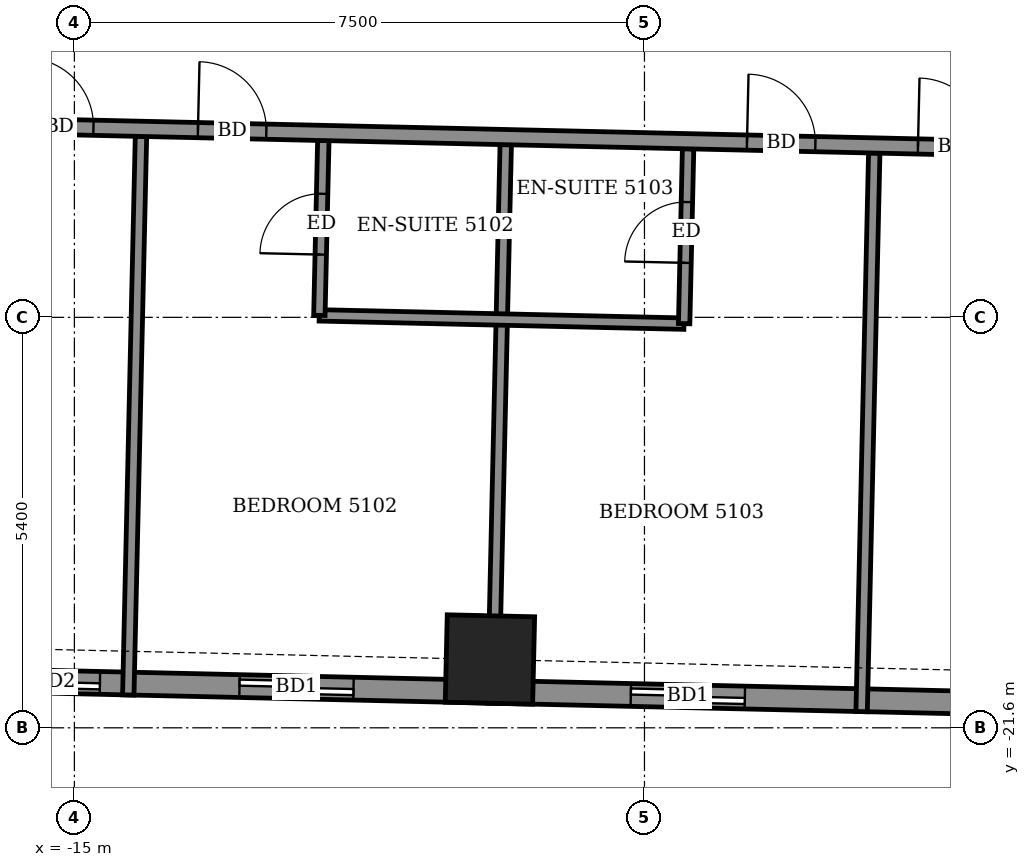
"""IFC4 building model, lengths in metres.
Left out: names, types, materials, properties, quantities, classifications, styles, units other than length and angle.
Written with IfcOpenShell. Run it as: python <this file> out.ifc"""

import sys

from ifc_helpers import new_model, si_unit, direction, frame, frame_2d, origin, origin_2d, place, context, subcontext, project, spatial, rectangle, extrude, element, fill, save


model = new_model("IFC4")
c1 = context("Model", 3, precision=1e-05, world=origin(), true_north=direction((0.0, 1.0)))
c2 = subcontext(c1, "Body", "Model", "MODEL_VIEW")
j1 = project(units=[si_unit("LENGTHUNIT", "METRE"), si_unit("PLANEANGLEUNIT", "RADIAN")], contexts=[c1])
p1 = place(None, origin())
s1 = spatial("IfcSite", under=j1, at=p1, CompositionType="ELEMENT")
p2 = place(p1, origin())
s2 = spatial("IfcBuilding", under=s1, at=p2, CompositionType="ELEMENT")
p3 = place(p2, frame((0.0, 0.0, 201.5)))
s3 = spatial("IfcBuildingStorey", under=s2, at=p3, CompositionType="ELEMENT", Elevation=201.5)
p4 = place(p3, frame((-9.533, -20.701, -0.55), z_axis=(0.0, 0.0, 1.0), x_axis=(0.999742129581, -0.022708464065, 0.0)))
e1 = element("IfcColumn", 1, at=p4, inside=s3, PredefinedType="COLUMN", context=c2, shape_type="SweptSolid", body=[
    extrude(rectangle(XDim=1.15, YDim=1.15, at=origin_2d()), origin(), (0.0, 0.0, 1.0), 3.6),
])
p5 = place(p3, frame((-23.437, -20.81, 0.0), z_axis=(0.0, 0.0, 1.0), x_axis=(0.999742269115, -0.022702320244, 0.0)))
e2 = element("IfcWall", 2, at=p5, inside=s3, PredefinedType="SOLIDWALL", context=c2, shape_type="SweptSolid", body=[
    extrude(rectangle(XDim=41.844, YDim=0.3, at=frame_2d((20.922, 0.0))), origin(), (0.0, 0.0, 1.0), 2.55),
])
p6 = place(p5, frame((1.899, 0.0, 0.0)))
e3 = element("IfcOpeningElement", 3, at=p6, cuts=e2, PredefinedType="OPENING", context=c2, shape_type="SweptSolid", body=[
    extrude(rectangle(XDim=1.5, YDim=2.4, at=frame_2d((0.75, 1.2))), frame((0.0, 0.16, 0.0), z_axis=(0.0, -1.0, 0.0), x_axis=(1.0, 0.0, 0.0)), (0.0, 0.0, 1.0), 0.32),
])
p7 = place(p5, frame((7.575, 0.0, 0.0)))
e4 = element("IfcOpeningElement", 4, at=p7, cuts=e2, PredefinedType="OPENING", context=c2, shape_type="SweptSolid", body=[
    extrude(rectangle(XDim=1.2, YDim=2.4, at=frame_2d((0.6, 1.2))), frame((0.0, 0.16, 0.0), z_axis=(0.0, -1.0, 0.0), x_axis=(1.0, 0.0, 0.0)), (0.0, 0.0, 1.0), 0.32),
])
p8 = place(p5, frame((10.612, 0.0, 0.0)))
e5 = element("IfcOpeningElement", 5, at=p8, cuts=e2, PredefinedType="OPENING", context=c2, shape_type="SweptSolid", body=[
    extrude(rectangle(XDim=1.5, YDim=2.4, at=frame_2d((0.75, 1.2))), frame((0.0, 0.16, 0.0), z_axis=(0.0, -1.0, 0.0), x_axis=(1.0, 0.0, 0.0)), (0.0, 0.0, 1.0), 0.32),
])
p9 = place(p5, frame((15.762, 0.0, 0.0)))
e6 = element("IfcOpeningElement", 6, at=p9, cuts=e2, PredefinedType="OPENING", context=c2, shape_type="SweptSolid", body=[
    extrude(rectangle(XDim=1.5, YDim=2.4, at=frame_2d((0.75, 1.2))), frame((0.0, 0.16, 0.0), z_axis=(0.0, -1.0, 0.0), x_axis=(1.0, 0.0, 0.0)), (0.0, 0.0, 1.0), 0.32),
])
p10 = place(p5, frame((21.648, 0.0, 0.0)))
e7 = element("IfcOpeningElement", 7, at=p10, cuts=e2, PredefinedType="OPENING", context=c2, shape_type="SweptSolid", body=[
    extrude(rectangle(XDim=1.2, YDim=2.4, at=frame_2d((0.6, 1.2))), frame((0.0, 0.16, 0.0), z_axis=(0.0, -1.0, 0.0), x_axis=(1.0, 0.0, 0.0)), (0.0, 0.0, 1.0), 0.32),
])
p11 = place(p5, frame((24.685, 0.0, 0.0)))
e8 = element("IfcOpeningElement", 8, at=p11, cuts=e2, PredefinedType="OPENING", context=c2, shape_type="SweptSolid", body=[
    extrude(rectangle(XDim=1.5, YDim=2.4, at=frame_2d((0.75, 1.2))), frame((0.0, 0.16, 0.0), z_axis=(0.0, -1.0, 0.0), x_axis=(1.0, 0.0, 0.0)), (0.0, 0.0, 1.0), 0.32),
])
p12 = place(p5, frame((29.685, 0.0, 0.0)))
e9 = element("IfcOpeningElement", 9, at=p12, cuts=e2, PredefinedType="OPENING", context=c2, shape_type="SweptSolid", body=[
    extrude(rectangle(XDim=1.5, YDim=2.4, at=frame_2d((0.75, 1.2))), frame((0.0, 0.16, 0.0), z_axis=(0.0, -1.0, 0.0), x_axis=(1.0, 0.0, 0.0)), (0.0, 0.0, 1.0), 0.32),
])
p13 = place(p5, frame((33.022, 0.0, 0.0)))
e10 = element("IfcOpeningElement", 10, at=p13, cuts=e2, PredefinedType="OPENING", context=c2, shape_type="SweptSolid", body=[
    extrude(rectangle(XDim=1.2, YDim=2.4, at=frame_2d((0.6, 1.2))), frame((0.0, 0.16, 0.0), z_axis=(0.0, -1.0, 0.0), x_axis=(1.0, 0.0, 0.0)), (0.0, 0.0, 1.0), 0.32),
])
p14 = place(p5, frame((37.974, 0.0, 0.9)))
e11 = element("IfcOpeningElement", 11, at=p14, cuts=e2, PredefinedType="OPENING", context=c2, shape_type="SweptSolid", body=[
    extrude(rectangle(XDim=2.4, YDim=1.5, at=frame_2d((1.2, 0.75))), frame((0.0, 0.16, 0.0), z_axis=(0.0, -1.0, 0.0), x_axis=(1.0, 0.0, 0.0)), (0.0, 0.0, 1.0), 0.32),
])
p15 = place(p3, frame((-14.291, -21.168, 0.0), z_axis=(0.0, 0.0, 1.0), x_axis=(0.022720650804, 0.999741852694, 0.0)))
e12 = element("IfcWall", 12, at=p15, inside=s3, PredefinedType="PARTITIONING", context=c2, shape_type="SweptSolid", body=[
    extrude(rectangle(XDim=7.35, YDim=0.15, at=frame_2d((3.675, 0.0))), origin(), (0.0, 0.0, 1.0), 2.55),
])
p16 = place(p3, frame((-9.492, -21.277, 0.0), z_axis=(0.0, 0.0, 1.0), x_axis=(0.022719896304, 0.99974186984, 0.0)))
e13 = element("IfcWall", 13, at=p16, inside=s3, PredefinedType="PARTITIONING", context=c2, shape_type="SweptSolid", body=[
    extrude(rectangle(XDim=7.35, YDim=0.15, at=frame_2d((3.675, 0.0))), origin(), (0.0, 0.0, 1.0), 3.05),
])
p17 = place(p3, frame((-4.643, -21.387, 0.0), z_axis=(0.0, 0.0, 1.0), x_axis=(0.022587849492, 0.99974486198, 0.0)))
e14 = element("IfcWall", 14, at=p17, inside=s3, PredefinedType="PARTITIONING", context=c2, shape_type="SweptSolid", body=[
    extrude(rectangle(XDim=7.35, YDim=0.15, at=frame_2d((3.675, 0.0))), origin(), (0.0, 0.0, 1.0), 2.55),
])
p18 = place(p3, frame((-11.779, -16.174, 0.0), z_axis=(0.0, 0.0, 1.0), x_axis=(0.999742701292, -0.022683280499, 0.0)))
e15 = element("IfcWall", 15, at=p18, inside=s3, PredefinedType="PARTITIONING", context=c2, shape_type="SweptSolid", body=[
    extrude(rectangle(XDim=4.8, YDim=0.15, at=frame_2d((2.4, 0.0))), origin(), (0.0, 0.0, 1.0), 3.05),
])
p19 = place(p3, frame((-11.777, -16.174, 0.0), z_axis=(0.0, 0.0, 1.0), x_axis=(0.022603288534, 0.999744513037, 0.0)))
e16 = element("IfcWall", 16, at=p19, inside=s3, PredefinedType="PARTITIONING", context=c2, shape_type="SweptSolid", body=[
    extrude(rectangle(XDim=2.301, YDim=0.15, at=frame_2d((1.15, 0.0))), origin(), (0.0, 0.0, 1.0), 3.05),
])
p20 = place(p19, frame((0.8, 0.0, 0.0)))
e17 = element("IfcOpeningElement", 17, at=p20, cuts=e16, PredefinedType="OPENING", context=c2, shape_type="SweptSolid", body=[
    extrude(rectangle(XDim=0.8, YDim=2.1, at=frame_2d((0.4, 1.05))), frame((0.0, 0.085, 0.0), z_axis=(0.0, -1.0, 0.0), x_axis=(1.0, 0.0, 0.0)), (0.0, 0.0, 1.0), 0.17),
])
p21 = place(p3, frame((-6.978, -16.283, 0.0), z_axis=(0.0, 0.0, 1.0), x_axis=(0.022603288534, 0.999744513037, 0.0)))
e18 = element("IfcWall", 18, at=p21, inside=s3, PredefinedType="PARTITIONING", context=c2, shape_type="SweptSolid", body=[
    extrude(rectangle(XDim=2.301, YDim=0.15, at=frame_2d((1.15, 0.0))), origin(), (0.0, 0.0, 1.0), 3.05),
])
p22 = place(p21, frame((0.8, 0.0, 0.0)))
e19 = element("IfcOpeningElement", 19, at=p22, cuts=e18, PredefinedType="OPENING", context=c2, shape_type="SweptSolid", body=[
    extrude(rectangle(XDim=0.8, YDim=2.1, at=frame_2d((0.4, 1.05))), frame((0.0, 0.085, 0.0), z_axis=(0.0, -1.0, 0.0), x_axis=(1.0, 0.0, 0.0)), (0.0, 0.0, 1.0), 0.17),
])
p23 = place(p3, frame((-26.421, -13.441, 0.0), z_axis=(0.0, 0.0, 1.0), x_axis=(0.999742754064, -0.022680954485, 0.0)))
e20 = element("IfcWall", 20, at=p23, inside=s3, PredefinedType="PARTITIONING", context=c2, shape_type="SweptSolid", body=[
    extrude(rectangle(XDim=48.945, YDim=0.2, at=frame_2d((24.472, 0.0))), origin(), (0.0, 0.0, 1.0), 3.05),
])
p24 = place(p23, frame((1.375, 0.0, 0.0)))
e21 = element("IfcOpeningElement", 21, at=p24, cuts=e20, PredefinedType="OPENING", context=c2, shape_type="SweptSolid", body=[
    extrude(rectangle(XDim=1.0, YDim=2.1, at=frame_2d((0.5, 1.05))), frame((0.0, 0.11, 0.0), z_axis=(0.0, -1.0, 0.0), x_axis=(1.0, 0.0, 0.0)), (0.0, 0.0, 1.0), 0.22),
])
p25 = place(p23, frame((6.0, 0.0, 0.0)))
e22 = element("IfcOpeningElement", 22, at=p25, cuts=e20, PredefinedType="OPENING", context=c2, shape_type="SweptSolid", body=[
    extrude(rectangle(XDim=0.9, YDim=2.1, at=frame_2d((0.45, 1.05))), frame((0.0, 0.11, 0.0), z_axis=(0.0, -1.0, 0.0), x_axis=(1.0, 0.0, 0.0)), (0.0, 0.0, 1.0), 0.22),
])
p26 = place(p23, frame((10.775, 0.0, 0.0)))
e23 = element("IfcOpeningElement", 23, at=p26, cuts=e20, PredefinedType="OPENING", context=c2, shape_type="SweptSolid", body=[
    extrude(rectangle(XDim=0.9, YDim=2.1, at=frame_2d((0.45, 1.05))), frame((0.0, 0.11, 0.0), z_axis=(0.0, -1.0, 0.0), x_axis=(1.0, 0.0, 0.0)), (0.0, 0.0, 1.0), 0.22),
])
p27 = place(p23, frame((13.05, 0.0, 0.0)))
e24 = element("IfcOpeningElement", 24, at=p27, cuts=e20, PredefinedType="OPENING", context=c2, shape_type="SweptSolid", body=[
    extrude(rectangle(XDim=0.9, YDim=2.1, at=frame_2d((0.45, 1.05))), frame((0.0, 0.11, 0.0), z_axis=(0.0, -1.0, 0.0), x_axis=(1.0, 0.0, 0.0)), (0.0, 0.0, 1.0), 0.22),
])
p28 = place(p23, frame((20.275, 0.0, 0.0)))
e25 = element("IfcOpeningElement", 25, at=p28, cuts=e20, PredefinedType="OPENING", context=c2, shape_type="SweptSolid", body=[
    extrude(rectangle(XDim=0.9, YDim=2.1, at=frame_2d((0.45, 1.05))), frame((0.0, 0.11, 0.0), z_axis=(0.0, -1.0, 0.0), x_axis=(1.0, 0.0, 0.0)), (0.0, 0.0, 1.0), 0.22),
])
p29 = place(p23, frame((22.525, 0.0, 0.0)))
e26 = element("IfcOpeningElement", 26, at=p29, cuts=e20, PredefinedType="OPENING", context=c2, shape_type="SweptSolid", body=[
    extrude(rectangle(XDim=0.9, YDim=2.1, at=frame_2d((0.45, 1.05))), frame((0.0, 0.11, 0.0), z_axis=(0.0, -1.0, 0.0), x_axis=(1.0, 0.0, 0.0)), (0.0, 0.0, 1.0), 0.22),
])
p30 = place(p23, frame((29.6, 0.0, 0.0)))
e27 = element("IfcOpeningElement", 27, at=p30, cuts=e20, PredefinedType="OPENING", context=c2, shape_type="SweptSolid", body=[
    extrude(rectangle(XDim=0.9, YDim=2.1, at=frame_2d((0.45, 1.05))), frame((0.0, 0.11, 0.0), z_axis=(0.0, -1.0, 0.0), x_axis=(1.0, 0.0, 0.0)), (0.0, 0.0, 1.0), 0.22),
])
p31 = place(p23, frame((31.875, 0.0, 0.0)))
e28 = element("IfcOpeningElement", 28, at=p31, cuts=e20, PredefinedType="OPENING", context=c2, shape_type="SweptSolid", body=[
    extrude(rectangle(XDim=0.9, YDim=2.1, at=frame_2d((0.45, 1.05))), frame((0.0, 0.11, 0.0), z_axis=(0.0, -1.0, 0.0), x_axis=(1.0, 0.0, 0.0)), (0.0, 0.0, 1.0), 0.22),
])
p32 = place(p23, frame((38.85, 0.0, 0.0)))
e29 = element("IfcOpeningElement", 29, at=p32, cuts=e20, PredefinedType="OPENING", context=c2, shape_type="SweptSolid", body=[
    extrude(rectangle(XDim=0.9, YDim=2.1, at=frame_2d((0.45, 1.05))), frame((0.0, 0.11, 0.0), z_axis=(0.0, -1.0, 0.0), x_axis=(1.0, 0.0, 0.0)), (0.0, 0.0, 1.0), 0.22),
])
p33 = place(p23, frame((46.097, 0.0, 0.0)))
e30 = element("IfcOpeningElement", 30, at=p33, cuts=e20, PredefinedType="OPENING", context=c2, shape_type="SweptSolid", body=[
    extrude(rectangle(XDim=1.0, YDim=2.1, at=frame_2d((0.5, 1.05))), frame((0.0, 0.11, 0.0), z_axis=(0.0, -1.0, 0.0), x_axis=(1.0, 0.0, 0.0)), (0.0, 0.0, 1.0), 0.22),
])
p34 = place(p23, frame((41.2, 0.0, 0.0)))
e31 = element("IfcOpeningElement", 31, at=p34, cuts=e20, PredefinedType="OPENING", context=c2, shape_type="SweptSolid", body=[
    extrude(rectangle(XDim=0.9, YDim=2.1, at=frame_2d((0.45, 1.05))), frame((0.0, 0.11, 0.0), z_axis=(0.0, -1.0, 0.0), x_axis=(1.0, 0.0, 0.0)), (0.0, 0.0, 1.0), 0.22),
])
p35 = place(p7, origin())
e32 = element("IfcDoor", 32, at=p35, inside=s3, OperationType="SLIDING_TO_LEFT", PredefinedType="DOOR", context=c2, shape_type="SweptSolid", body=[
    extrude(rectangle(XDim=1.2, YDim=2.4, at=frame_2d((0.6, 1.2))), frame((0.0, 0.025, 0.0), z_axis=(0.0, -1.0, 0.0), x_axis=(1.0, 0.0, 0.0)), (0.0, 0.0, 1.0), 0.05),
])
fill(e4, e32)
p36 = place(p8, origin())
e33 = element("IfcDoor", 33, at=p36, inside=s3, OperationType="SLIDING_TO_LEFT", PredefinedType="DOOR", context=c2, shape_type="SweptSolid", body=[
    extrude(rectangle(XDim=1.5, YDim=2.4, at=frame_2d((0.75, 1.2))), frame((0.0, 0.025, 0.0), z_axis=(0.0, -1.0, 0.0), x_axis=(1.0, 0.0, 0.0)), (0.0, 0.0, 1.0), 0.05),
])
fill(e5, e33)
p37 = place(p9, origin())
e34 = element("IfcDoor", 34, at=p37, inside=s3, OperationType="SLIDING_TO_LEFT", PredefinedType="DOOR", context=c2, shape_type="SweptSolid", body=[
    extrude(rectangle(XDim=1.5, YDim=2.4, at=frame_2d((0.75, 1.2))), frame((0.0, 0.025, 0.0), z_axis=(0.0, -1.0, 0.0), x_axis=(1.0, 0.0, 0.0)), (0.0, 0.0, 1.0), 0.05),
])
fill(e6, e34)
p38 = place(p26, origin())
e35 = element("IfcDoor", 35, at=p38, inside=s3, OperationType="SINGLE_SWING_LEFT", PredefinedType="DOOR", context=c2, shape_type="SweptSolid", body=[
    extrude(rectangle(XDim=0.9, YDim=2.1, at=frame_2d((0.45, 1.05))), frame((0.0, 0.025, 0.0), z_axis=(0.0, -1.0, 0.0), x_axis=(1.0, 0.0, 0.0)), (0.0, 0.0, 1.0), 0.05),
])
fill(e23, e35)
p39 = place(p27, origin())
e36 = element("IfcDoor", 36, at=p39, inside=s3, OperationType="SINGLE_SWING_RIGHT", PredefinedType="DOOR", context=c2, shape_type="SweptSolid", body=[
    extrude(rectangle(XDim=0.9, YDim=2.1, at=frame_2d((0.45, 1.05))), frame((0.0, 0.025, 0.0), z_axis=(0.0, -1.0, 0.0), x_axis=(1.0, 0.0, 0.0)), (0.0, 0.0, 1.0), 0.05),
])
fill(e24, e36)
p40 = place(p20, origin())
e37 = element("IfcDoor", 37, at=p40, inside=s3, OperationType="SINGLE_SWING_RIGHT", PredefinedType="DOOR", context=c2, shape_type="SweptSolid", body=[
    extrude(rectangle(XDim=0.8, YDim=2.1, at=frame_2d((0.4, 1.05))), frame((0.0, 0.025, 0.0), z_axis=(0.0, -1.0, 0.0), x_axis=(1.0, 0.0, 0.0)), (0.0, 0.0, 1.0), 0.05),
])
fill(e17, e37)
p41 = place(p28, origin())
e38 = element("IfcDoor", 38, at=p41, inside=s3, OperationType="SINGLE_SWING_LEFT", PredefinedType="DOOR", context=c2, shape_type="SweptSolid", body=[
    extrude(rectangle(XDim=0.9, YDim=2.1, at=frame_2d((0.45, 1.05))), frame((0.0, 0.025, 0.0), z_axis=(0.0, -1.0, 0.0), x_axis=(1.0, 0.0, 0.0)), (0.0, 0.0, 1.0), 0.05),
])
fill(e25, e38)
p42 = place(p22, origin())
e39 = element("IfcDoor", 39, at=p42, inside=s3, OperationType="SINGLE_SWING_LEFT", PredefinedType="DOOR", context=c2, shape_type="SweptSolid", body=[
    extrude(rectangle(XDim=0.8, YDim=2.1, at=frame_2d((0.4, 1.05))), frame((0.0, 0.025, 0.0), z_axis=(0.0, -1.0, 0.0), x_axis=(1.0, 0.0, 0.0)), (0.0, 0.0, 1.0), 0.05),
])
fill(e19, e39)
p43 = place(p29, origin())
e40 = element("IfcDoor", 40, at=p43, inside=s3, OperationType="SINGLE_SWING_RIGHT", PredefinedType="DOOR", context=c2, shape_type="SweptSolid", body=[
    extrude(rectangle(XDim=0.9, YDim=2.1, at=frame_2d((0.45, 1.05))), frame((0.0, 0.025, 0.0), z_axis=(0.0, -1.0, 0.0), x_axis=(1.0, 0.0, 0.0)), (0.0, 0.0, 1.0), 0.05),
])
fill(e26, e40)
save(model, sys.argv[1])
